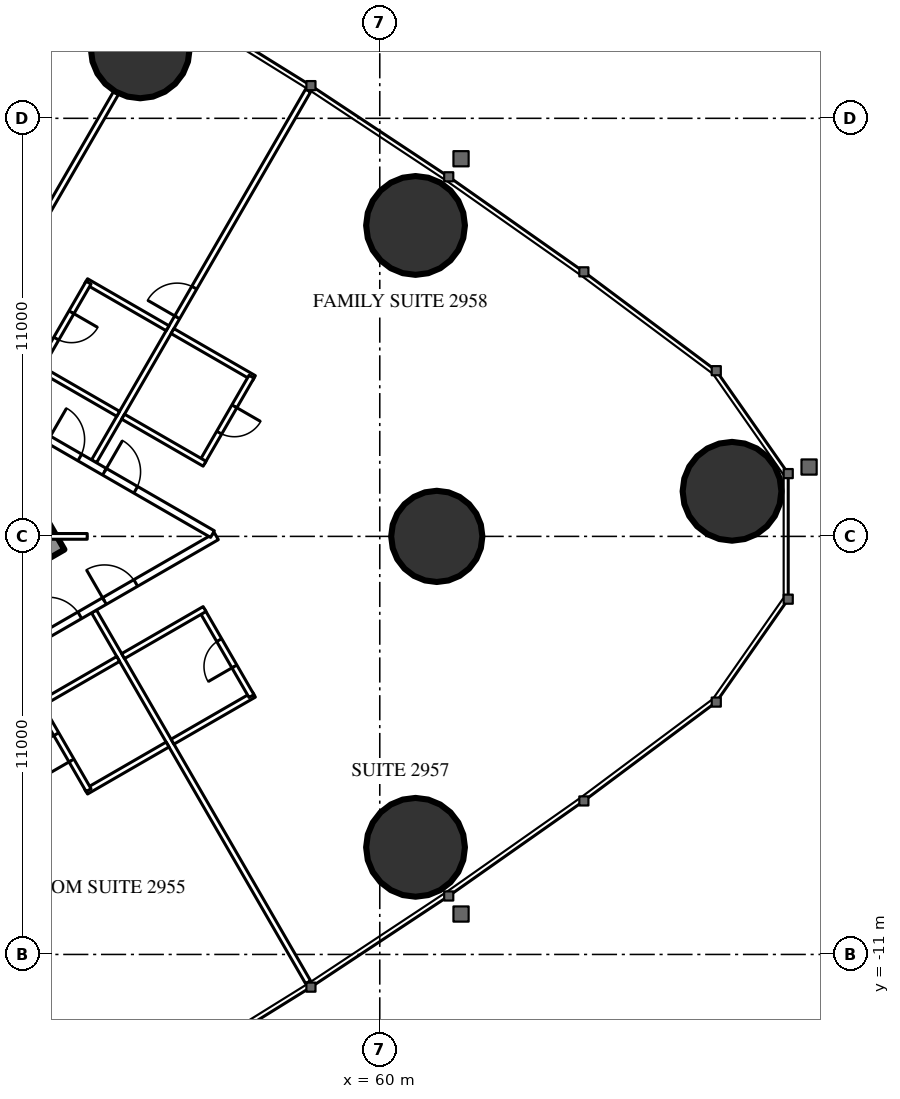
"""IFC4 building model, lengths in metres.
Left out: names, types, materials, properties, quantities, classifications, styles, units other than length and angle.
Written with IfcOpenShell. Run it as: python <this file> out.ifc"""

import sys

from ifc_helpers import new_model, si_unit, direction, frame, frame_2d, origin, origin_2d, place, context, subcontext, project, spatial, rectangle, circle, hollow_circle, extrude, element, fill, save


model = new_model("IFC4")
c1 = context("Model", 3, precision=1e-05, world=origin(), true_north=direction((0.0, 1.0)))
c2 = subcontext(c1, "Body", "Model", "MODEL_VIEW")
j1 = project(units=[si_unit("LENGTHUNIT", "METRE"), si_unit("PLANEANGLEUNIT", "RADIAN")], contexts=[c1])
p1 = place(None, origin())
s1 = spatial("IfcSite", under=j1, at=p1, CompositionType="ELEMENT")
p2 = place(p1, origin())
s2 = spatial("IfcBuilding", under=s1, at=p2, CompositionType="ELEMENT")
p3 = place(p2, frame((0.0, 0.0, 111.6)))
s3 = spatial("IfcBuildingStorey", under=s2, at=p3, CompositionType="ELEMENT", Elevation=111.6)
for number, where, z_axis, x_axis in (
    (1, (69.269, 1.187, 0.0), (0.0, 0.0, 1.0), (1.0, 0.0, 0.0)),
    (2, (60.941, 8.181, 0.0), (0.0, 0.0, 1.0), (1.0, 0.0, 0.0)),
    (3, (53.697, 12.827, 0.0), (0.0, 0.0, 1.0), (1.0, 0.0, 0.0)),
    (4, (60.941, -8.181, 0.0), (0.0, 0.0, 1.0), (1.0, 0.0, 0.0)),
):
    element("IfcColumn", number, at=place(p3, frame(where, z_axis=z_axis, x_axis=x_axis)), inside=s3, PredefinedType="COLUMN", context=c2, shape_type="SweptSolid", body=[
        extrude(hollow_circle(Radius=1.3, WallThickness=0.1, at=origin_2d()), origin(), (0.0, 0.0, 1.0), 3.5),
    ])
p4 = place(p3, frame((61.5, 0.0, 0.0), z_axis=(0.0, 0.0, 1.0), x_axis=(1.0, 0.0, 0.0)))
e5 = element("IfcColumn", 5, at=p4, inside=s3, PredefinedType="COLUMN", context=c2, shape_type="SweptSolid", body=[
    extrude(circle(Radius=1.2, at=origin_2d()), origin(), (0.0, 0.0, 1.0), 3.5),
])
p5 = place(p3, frame((27.2, -13.8, 0.0), z_axis=(0.0, 0.0, 1.0), x_axis=(0.866027159892, 0.499996958321, 0.0)))
e6 = element("IfcWall", 6, at=p5, inside=s3, PredefinedType="SHEAR", context=c2, shape_type="SweptSolid", body=[
    extrude(rectangle(XDim=27.947, YDim=1.2, at=frame_2d((13.973, 0.0))), origin(), (0.0, 0.0, 1.0), 3.5),
])
p6 = place(p5, frame((4.6, 0.0, 0.0)))
e7 = element("IfcOpeningElement", 7, at=p6, cuts=e6, PredefinedType="OPENING", context=c2, shape_type="SweptSolid", body=[
    extrude(rectangle(XDim=1.0, YDim=2.2, at=frame_2d((0.5, 1.1))), frame((0.0, 0.61, 0.0), z_axis=(0.0, -1.0, 0.0), x_axis=(1.0, 0.0, 0.0)), (0.0, 0.0, 1.0), 1.22),
])
p7 = place(p5, frame((13.395, 0.0, 0.0)))
e8 = element("IfcOpeningElement", 8, at=p7, cuts=e6, PredefinedType="OPENING", context=c2, shape_type="SweptSolid", body=[
    extrude(rectangle(XDim=1.8, YDim=2.2, at=frame_2d((0.9, 1.1))), frame((0.0, 0.61, 0.0), z_axis=(0.0, -1.0, 0.0), x_axis=(1.0, 0.0, 0.0)), (0.0, 0.0, 1.0), 1.22),
])
p8 = place(p3, frame((52.481, -1.975, 0.0), z_axis=(0.0, 0.0, 1.0), x_axis=(0.500003867771, -0.866023170714, 0.0)))
e9 = element("IfcWall", 9, at=p8, inside=s3, PredefinedType="PARTITIONING", context=c2, shape_type="SweptSolid", body=[
    extrude(rectangle(XDim=11.265, YDim=0.15, at=frame_2d((5.632, 0.0))), origin(), (0.0, 0.0, 1.0), 3.25),
])
p9 = place(p3, frame((48.719, 4.147, 0.0), z_axis=(0.0, 0.0, 1.0), x_axis=(0.499993328235, 0.866029255696, 0.0)))
e10 = element("IfcWall", 10, at=p9, inside=s3, PredefinedType="PARTITIONING", context=c2, shape_type="SweptSolid", body=[
    extrude(rectangle(XDim=8.686, YDim=0.15, at=frame_2d((4.343, 0.0))), origin(), (0.0, 0.0, 1.0), 2.2),
])
p10 = place(p3, frame((52.481, 1.975, 0.0), z_axis=(0.0, 0.0, 1.0), x_axis=(0.500003867771, 0.866023170714, 0.0)))
e11 = element("IfcWall", 11, at=p10, inside=s3, PredefinedType="PARTITIONING", context=c2, shape_type="SweptSolid", body=[
    extrude(rectangle(XDim=11.265, YDim=0.15, at=frame_2d((5.632, 0.0))), origin(), (0.0, 0.0, 1.0), 3.25),
])
p11 = place(p10, frame((4.375, 0.0, 0.0)))
e12 = element("IfcOpeningElement", 12, at=p11, cuts=e11, PredefinedType="OPENING", context=c2, shape_type="SweptSolid", body=[
    extrude(rectangle(XDim=0.9, YDim=2.2, at=frame_2d((0.45, 1.1))), frame((0.0, 0.085, 0.0), z_axis=(0.0, -1.0, 0.0), x_axis=(1.0, 0.0, 0.0)), (0.0, 0.0, 1.0), 0.17),
])
p12 = place(p3, frame((37.96, -10.243, 0.0), z_axis=(0.0, 0.0, 1.0), x_axis=(0.866026429433, 0.499998223521, 0.0)))
e13 = element("IfcWall", 13, at=p12, inside=s3, PredefinedType="PARTITIONING", context=c2, shape_type="SweptSolid", body=[
    extrude(rectangle(XDim=20.487, YDim=0.2, at=frame_2d((10.243, 0.0))), origin(), (0.0, 0.0, 1.0), 3.25),
])
p13 = place(p12, frame((4.343, 0.0, 0.0)))
e14 = element("IfcOpeningElement", 14, at=p13, cuts=e13, PredefinedType="OPENING", context=c2, shape_type="SweptSolid", body=[
    extrude(rectangle(XDim=0.95, YDim=2.2, at=frame_2d((0.475, 1.1))), frame((0.0, 0.11, 0.0), z_axis=(0.0, -1.0, 0.0), x_axis=(1.0, 0.0, 0.0)), (0.0, 0.0, 1.0), 0.22),
])
p14 = place(p12, frame((15.385, 0.0, 0.0)))
e15 = element("IfcOpeningElement", 15, at=p14, cuts=e13, PredefinedType="OPENING", context=c2, shape_type="SweptSolid", body=[
    extrude(rectangle(XDim=0.95, YDim=2.2, at=frame_2d((0.475, 1.1))), frame((0.0, 0.11, 0.0), z_axis=(0.0, -1.0, 0.0), x_axis=(1.0, 0.0, 0.0)), (0.0, 0.0, 1.0), 0.22),
])
p15 = place(p12, frame((17.085, 0.0, 0.0)))
e16 = element("IfcOpeningElement", 16, at=p15, cuts=e13, PredefinedType="OPENING", context=c2, shape_type="SweptSolid", body=[
    extrude(rectangle(XDim=0.95, YDim=2.2, at=frame_2d((0.475, 1.1))), frame((0.0, 0.11, 0.0), z_axis=(0.0, -1.0, 0.0), x_axis=(1.0, 0.0, 0.0)), (0.0, 0.0, 1.0), 0.22),
])
p16 = place(p12, frame((1.048, 0.0, 0.0)))
e17 = element("IfcOpeningElement", 17, at=p16, cuts=e13, PredefinedType="OPENING", context=c2, shape_type="SweptSolid", body=[
    extrude(rectangle(XDim=1.8, YDim=2.2, at=frame_2d((0.9, 1.1))), frame((0.0, 0.11, 0.0), z_axis=(0.0, -1.0, 0.0), x_axis=(1.0, 0.0, 0.0)), (0.0, 0.0, 1.0), 0.22),
])
p17 = place(p3, frame((44.925, 6.222, 0.0), z_axis=(0.0, 0.0, 1.0), x_axis=(0.866025590081, -0.499999677325, 0.0)))
e18 = element("IfcWall", 18, at=p17, inside=s3, PredefinedType="PARTITIONING", context=c2, shape_type="SweptSolid", body=[
    extrude(rectangle(XDim=12.324, YDim=0.2, at=frame_2d((6.162, 0.0))), origin(), (0.0, 0.0, 1.0), 3.25),
])
p18 = place(p17, frame((9.042, 0.0, 0.0)))
e19 = element("IfcOpeningElement", 19, at=p18, cuts=e18, PredefinedType="OPENING", context=c2, shape_type="SweptSolid", body=[
    extrude(rectangle(XDim=0.95, YDim=2.2, at=frame_2d((0.475, 1.1))), frame((0.0, 0.11, 0.0), z_axis=(0.0, -1.0, 0.0), x_axis=(1.0, 0.0, 0.0)), (0.0, 0.0, 1.0), 0.22),
])
p19 = place(p17, frame((7.342, 0.0, 0.0)))
e20 = element("IfcOpeningElement", 20, at=p19, cuts=e18, PredefinedType="OPENING", context=c2, shape_type="SweptSolid", body=[
    extrude(rectangle(XDim=0.95, YDim=2.2, at=frame_2d((0.475, 1.1))), frame((0.0, 0.11, 0.0), z_axis=(0.0, -1.0, 0.0), x_axis=(1.0, 0.0, 0.0)), (0.0, 0.0, 1.0), 0.22),
])
p20 = place(p17, frame((0.6, 0.0, 0.0)))
e21 = element("IfcOpeningElement", 21, at=p20, cuts=e18, PredefinedType="OPENING", context=c2, shape_type="SweptSolid", body=[
    extrude(rectangle(XDim=0.95, YDim=2.2, at=frame_2d((0.475, 1.1))), frame((0.0, 0.11, 0.0), z_axis=(0.0, -1.0, 0.0), x_axis=(1.0, 0.0, 0.0)), (0.0, 0.0, 1.0), 0.22),
])
p21 = place(p3, frame((52.273, -6.714, 0.0), z_axis=(0.0, 0.0, 1.0), x_axis=(0.866031185235, 0.4999899861, 0.0)))
e22 = element("IfcWall", 22, at=p21, inside=s3, PredefinedType="PARTITIONING", context=c2, shape_type="SweptSolid", body=[
    extrude(rectangle(XDim=2.475, YDim=0.15, at=frame_2d((1.238, 0.0))), origin(), (0.0, 0.0, 1.0), 3.25),
])
p22 = place(p3, frame((51.038, -4.425, 0.0), z_axis=(0.0, 0.0, 1.0), x_axis=(0.49997716683, -0.86603858612, 0.0)))
e23 = element("IfcWall", 23, at=p22, inside=s3, PredefinedType="PARTITIONING", context=c2, shape_type="SweptSolid", body=[
    extrude(rectangle(XDim=2.6, YDim=0.15, at=frame_2d((1.3, 0.0))), origin(), (0.0, 0.0, 1.0), 3.25),
])
p23 = place(p22, frame((0.9, 0.0, 0.0)))
e24 = element("IfcOpeningElement", 24, at=p23, cuts=e23, PredefinedType="OPENING", context=c2, shape_type="SweptSolid", body=[
    extrude(rectangle(XDim=0.8, YDim=2.2, at=frame_2d((0.4, 1.1))), frame((0.0, 0.085, 0.0), z_axis=(0.0, -1.0, 0.0), x_axis=(1.0, 0.0, 0.0)), (0.0, 0.0, 1.0), 0.17),
])
p24 = place(p3, frame((50.973, -4.462, 0.0), z_axis=(0.0, 0.0, 1.0), x_axis=(0.866031185235, 0.4999899861, 0.0)))
e25 = element("IfcWall", 25, at=p24, inside=s3, PredefinedType="PARTITIONING", context=c2, shape_type="SweptSolid", body=[
    extrude(rectangle(XDim=2.475, YDim=0.15, at=frame_2d((1.238, 0.0))), origin(), (0.0, 0.0, 1.0), 3.25),
])
p25 = place(p3, frame((54.546, -5.402, 0.0), z_axis=(0.0, 0.0, 1.0), x_axis=(0.866006523861, 0.500032699561, 0.0)))
e26 = element("IfcWall", 26, at=p25, inside=s3, PredefinedType="PARTITIONING", context=c2, shape_type="SweptSolid", body=[
    extrude(rectangle(XDim=2.475, YDim=0.15, at=frame_2d((1.237, 0.0))), origin(), (0.0, 0.0, 1.0), 3.25),
])
p26 = place(p3, frame((55.325, -1.95, 0.0), z_axis=(0.0, 0.0, 1.0), x_axis=(0.500006934395, -0.866021400173, 0.0)))
e27 = element("IfcWall", 27, at=p26, inside=s3, PredefinedType="PARTITIONING", context=c2, shape_type="SweptSolid", body=[
    extrude(rectangle(XDim=2.6, YDim=0.15, at=frame_2d((1.3, 0.0))), origin(), (0.0, 0.0, 1.0), 3.25),
])
p27 = place(p26, frame((0.9, 0.0, 0.0)))
e28 = element("IfcOpeningElement", 28, at=p27, cuts=e27, PredefinedType="OPENING", context=c2, shape_type="SweptSolid", body=[
    extrude(rectangle(XDim=0.8, YDim=2.2, at=frame_2d((0.4, 1.1))), frame((0.0, 0.085, 0.0), z_axis=(0.0, -1.0, 0.0), x_axis=(1.0, 0.0, 0.0)), (0.0, 0.0, 1.0), 0.17),
])
for number, where, z_axis, x_axis in (
    (29, (53.246, -3.15, 0.0), (0.0, 0.0, 1.0), (0.866, 0.5, 0.0)),
    (30, (54.546, 5.402, 0.0), (0.0, 0.0, 1.0), (0.866, -0.5, 0.0)),
):
    element("IfcWall", number, at=place(p3, frame(where, z_axis=z_axis, x_axis=x_axis)), inside=s3, PredefinedType="PARTITIONING", context=c2, shape_type="SweptSolid", body=[
        extrude(rectangle(XDim=2.475, YDim=0.15, at=frame_2d((1.237, 0.0))), origin(), (0.0, 0.0, 1.0), 3.25),
    ])
p28 = place(p3, frame((55.325, 1.95, 0.0), z_axis=(0.0, 0.0, 1.0), x_axis=(0.500006934395, 0.866021400173, 0.0)))
e31 = element("IfcWall", 31, at=p28, inside=s3, PredefinedType="PARTITIONING", context=c2, shape_type="SweptSolid", body=[
    extrude(rectangle(XDim=2.6, YDim=0.15, at=frame_2d((1.3, 0.0))), origin(), (0.0, 0.0, 1.0), 3.25),
])
p29 = place(p28, frame((0.9, 0.0, 0.0)))
e32 = element("IfcOpeningElement", 32, at=p29, cuts=e31, PredefinedType="OPENING", context=c2, shape_type="SweptSolid", body=[
    extrude(rectangle(XDim=0.8, YDim=2.2, at=frame_2d((0.4, 1.1))), frame((0.0, 0.085, 0.0), z_axis=(0.0, -1.0, 0.0), x_axis=(1.0, 0.0, 0.0)), (0.0, 0.0, 1.0), 0.17),
])
p30 = place(p3, frame((53.246, 3.15, 0.0), z_axis=(0.0, 0.0, 1.0), x_axis=(0.866006523861, -0.500032699561, 0.0)))
e33 = element("IfcWall", 33, at=p30, inside=s3, PredefinedType="PARTITIONING", context=c2, shape_type="SweptSolid", body=[
    extrude(rectangle(XDim=2.475, YDim=0.15, at=frame_2d((1.237, 0.0))), origin(), (0.0, 0.0, 1.0), 3.25),
])
p31 = place(p3, frame((52.273, 6.714, 0.0), z_axis=(0.0, 0.0, 1.0), x_axis=(0.866031185235, -0.4999899861, 0.0)))
e34 = element("IfcWall", 34, at=p31, inside=s3, PredefinedType="PARTITIONING", context=c2, shape_type="SweptSolid", body=[
    extrude(rectangle(XDim=2.475, YDim=0.15, at=frame_2d((1.238, 0.0))), origin(), (0.0, 0.0, 1.0), 3.25),
])
p32 = place(p3, frame((51.038, 4.425, 0.0), z_axis=(0.0, 0.0, 1.0), x_axis=(0.49997716683, 0.86603858612, 0.0)))
e35 = element("IfcWall", 35, at=p32, inside=s3, PredefinedType="PARTITIONING", context=c2, shape_type="SweptSolid", body=[
    extrude(rectangle(XDim=2.6, YDim=0.15, at=frame_2d((1.3, 0.0))), origin(), (0.0, 0.0, 1.0), 3.25),
])
p33 = place(p32, frame((0.9, 0.0, 0.0)))
e36 = element("IfcOpeningElement", 36, at=p33, cuts=e35, PredefinedType="OPENING", context=c2, shape_type="SweptSolid", body=[
    extrude(rectangle(XDim=0.8, YDim=2.2, at=frame_2d((0.4, 1.1))), frame((0.0, 0.085, 0.0), z_axis=(0.0, -1.0, 0.0), x_axis=(1.0, 0.0, 0.0)), (0.0, 0.0, 1.0), 0.17),
])
p34 = place(p3, frame((50.973, 4.462, 0.0), z_axis=(0.0, 0.0, 1.0), x_axis=(0.866031185235, -0.4999899861, 0.0)))
e37 = element("IfcWall", 37, at=p34, inside=s3, PredefinedType="PARTITIONING", context=c2, shape_type="SweptSolid", body=[
    extrude(rectangle(XDim=2.475, YDim=0.15, at=frame_2d((1.238, 0.0))), origin(), (0.0, 0.0, 1.0), 3.25),
])
p35 = place(p3, frame((44.575, 0.0, 0.0), z_axis=(0.0, 0.0, 1.0), x_axis=(1.0, 0.0, 0.0)))
e38 = element("IfcWall", 38, at=p35, inside=s3, PredefinedType="PARTITIONING", context=c2, shape_type="SweptSolid", body=[
    extrude(rectangle(XDim=7.727, YDim=0.15, at=frame_2d((3.864, 0.0))), origin(), (0.0, 0.0, 1.0), 2.2),
])
p36 = place(p23, origin())
e39 = element("IfcDoor", 39, at=p36, inside=s3, OperationType="SINGLE_SWING_RIGHT", PredefinedType="DOOR", context=c2, shape_type="SweptSolid", body=[
    extrude(rectangle(XDim=0.8, YDim=2.2, at=frame_2d((0.4, 1.1))), frame((0.0, 0.025, 0.0), z_axis=(0.0, -1.0, 0.0), x_axis=(1.0, 0.0, 0.0)), (0.0, 0.0, 1.0), 0.05),
])
fill(e24, e39)
p37 = place(p14, origin())
e40 = element("IfcDoor", 40, at=p37, inside=s3, OperationType="SINGLE_SWING_LEFT", PredefinedType="DOOR", context=c2, shape_type="SweptSolid", body=[
    extrude(rectangle(XDim=0.95, YDim=2.2, at=frame_2d((0.475, 1.1))), frame((0.0, 0.025, 0.0), z_axis=(0.0, -1.0, 0.0), x_axis=(1.0, 0.0, 0.0)), (0.0, 0.0, 1.0), 0.05),
])
fill(e15, e40)
p38 = place(p27, origin())
e41 = element("IfcDoor", 41, at=p38, inside=s3, OperationType="SINGLE_SWING_RIGHT", PredefinedType="DOOR", context=c2, shape_type="SweptSolid", body=[
    extrude(rectangle(XDim=0.8, YDim=2.2, at=frame_2d((0.4, 1.1))), frame((0.0, 0.025, 0.0), z_axis=(0.0, -1.0, 0.0), x_axis=(1.0, 0.0, 0.0)), (0.0, 0.0, 1.0), 0.05),
])
fill(e28, e41)
p39 = place(p15, origin())
e42 = element("IfcDoor", 42, at=p39, inside=s3, OperationType="SINGLE_SWING_LEFT", PredefinedType="DOOR", context=c2, shape_type="SweptSolid", body=[
    extrude(rectangle(XDim=0.95, YDim=2.2, at=frame_2d((0.475, 1.1))), frame((0.0, 0.025, 0.0), z_axis=(0.0, -1.0, 0.0), x_axis=(1.0, 0.0, 0.0)), (0.0, 0.0, 1.0), 0.05),
])
fill(e16, e42)
p40 = place(p29, origin())
e43 = element("IfcDoor", 43, at=p40, inside=s3, OperationType="SINGLE_SWING_RIGHT", PredefinedType="DOOR", context=c2, shape_type="SweptSolid", body=[
    extrude(rectangle(XDim=0.8, YDim=2.2, at=frame_2d((0.4, 1.1))), frame((0.0, 0.025, 0.0), z_axis=(0.0, -1.0, 0.0), x_axis=(1.0, 0.0, 0.0)), (0.0, 0.0, 1.0), 0.05),
])
fill(e32, e43)
p41 = place(p18, origin())
e44 = element("IfcDoor", 44, at=p41, inside=s3, OperationType="SINGLE_SWING_LEFT", PredefinedType="DOOR", context=c2, shape_type="SweptSolid", body=[
    extrude(rectangle(XDim=0.95, YDim=2.2, at=frame_2d((0.475, 1.1))), frame((0.0, 0.025, 0.0), z_axis=(0.0, -1.0, 0.0), x_axis=(1.0, 0.0, 0.0)), (0.0, 0.0, 1.0), 0.05),
])
fill(e19, e44)
p42 = place(p33, origin())
e45 = element("IfcDoor", 45, at=p42, inside=s3, OperationType="SINGLE_SWING_RIGHT", PredefinedType="DOOR", context=c2, shape_type="SweptSolid", body=[
    extrude(rectangle(XDim=0.8, YDim=2.2, at=frame_2d((0.4, 1.1))), frame((0.0, 0.025, 0.0), z_axis=(0.0, -1.0, 0.0), x_axis=(1.0, 0.0, 0.0)), (0.0, 0.0, 1.0), 0.05),
])
fill(e36, e45)
p43 = place(p19, origin())
e46 = element("IfcDoor", 46, at=p43, inside=s3, OperationType="SINGLE_SWING_LEFT", PredefinedType="DOOR", context=c2, shape_type="SweptSolid", body=[
    extrude(rectangle(XDim=0.95, YDim=2.2, at=frame_2d((0.475, 1.1))), frame((0.0, 0.025, 0.0), z_axis=(0.0, -1.0, 0.0), x_axis=(1.0, 0.0, 0.0)), (0.0, 0.0, 1.0), 0.05),
])
fill(e20, e46)
p44 = place(p11, origin())
e47 = element("IfcDoor", 47, at=p44, inside=s3, OperationType="SINGLE_SWING_LEFT", PredefinedType="DOOR", context=c2, shape_type="SweptSolid", body=[
    extrude(rectangle(XDim=0.9, YDim=2.2, at=frame_2d((0.45, 1.1))), frame((0.0, 0.025, 0.0), z_axis=(0.0, -1.0, 0.0), x_axis=(1.0, 0.0, 0.0)), (0.0, 0.0, 1.0), 0.05),
])
fill(e12, e47)
save(model, sys.argv[1])
